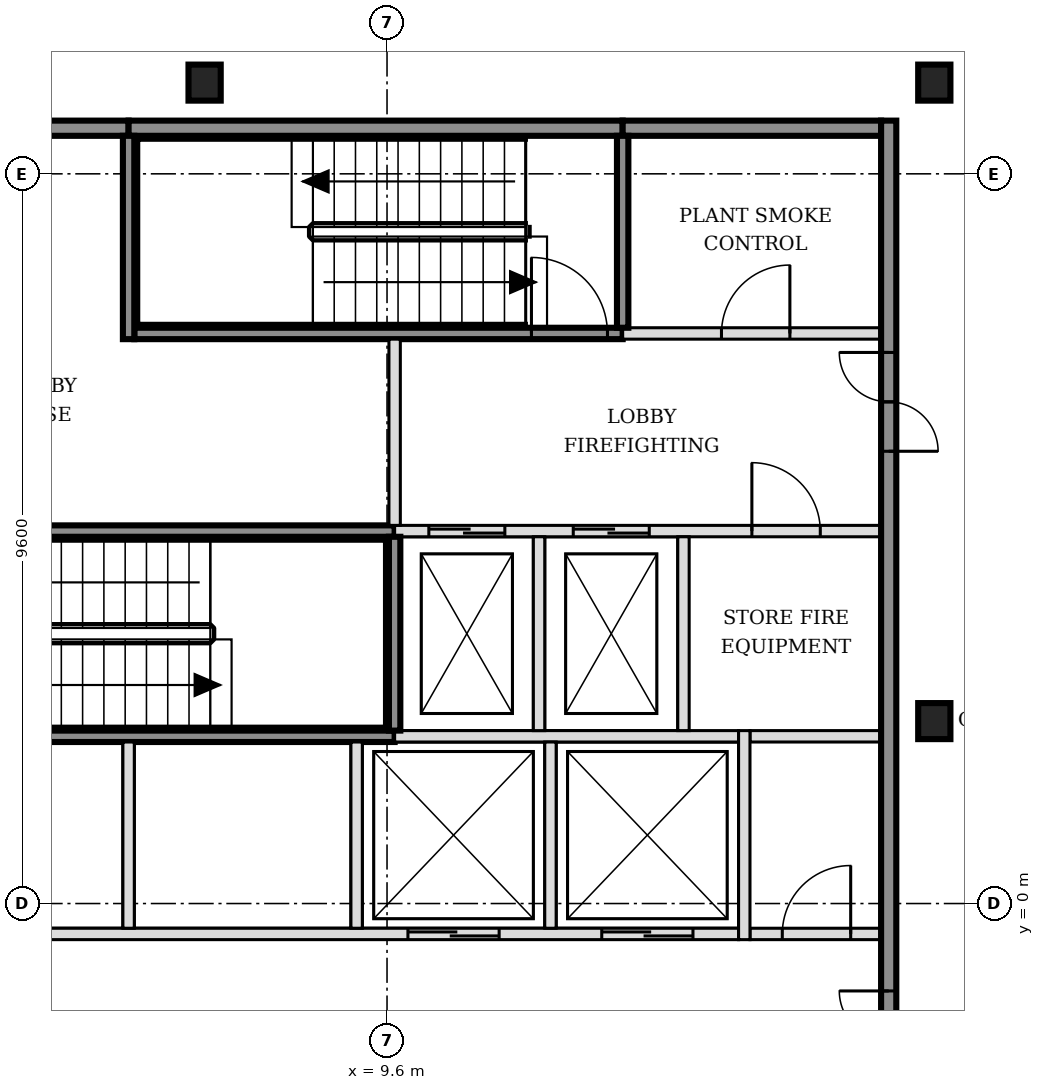
"""IFC4 building model, lengths in metres.
Left out: names, types, materials, properties, quantities, classifications, styles, units other than length and angle.
Written with IfcOpenShell. Run it as: python <this file> out.ifc"""

import sys

from ifc_helpers import new_model, si_unit, direction, frame, frame_2d, origin, origin_2d, place, context, subcontext, project, spatial, rectangle, i_section, extrude, element, fill, save


model = new_model("IFC4")
c1 = context("Model", 3, precision=1e-05, world=origin(), true_north=direction((0.0, 1.0)))
c2 = subcontext(c1, "Body", "Model", "MODEL_VIEW")
j1 = project(units=[si_unit("LENGTHUNIT", "METRE"), si_unit("PLANEANGLEUNIT", "RADIAN")], contexts=[c1])
p1 = place(None, origin())
s1 = spatial("IfcSite", under=j1, at=p1, CompositionType="ELEMENT")
p2 = place(p1, origin())
s2 = spatial("IfcBuilding", under=s1, at=p2, CompositionType="ELEMENT")
p3 = place(p2, frame((0.0, 0.0, 129.0)))
s3 = spatial("IfcBuildingStorey", under=s2, at=p3, CompositionType="ELEMENT", Elevation=129.0)
for number, where, z_axis, x_axis in (
    (1, (16.8, 2.4, -0.15), (0.0, 0.0, 1.0), (1.0, 0.0, 0.0)),
    (2, (7.2, 10.8, -0.15), (0.0, 0.0, 1.0), (1.0, 0.0, 0.0)),
    (3, (16.8, 10.8, -0.15), (0.0, 0.0, 1.0), (1.0, 0.0, 0.0)),
):
    element("IfcColumn", number, at=place(p3, frame(where, z_axis=z_axis, x_axis=x_axis)), inside=s3, PredefinedType="COLUMN", context=c2, shape_type="SweptSolid", body=[
        extrude(i_section(OverallWidth=0.424, OverallDepth=0.474, WebThickness=0.048, FlangeThickness=0.077, FilletRadius=0.015, at=origin_2d()), origin(), (0.0, 0.0, 1.0), 3.6),
    ])
p4 = place(p3, frame((-1.7, -0.4, 0.0), z_axis=(0.0, 0.0, 1.0), x_axis=(1.0, 0.0, 0.0)))
e4 = element("IfcWall", 4, at=p4, inside=s3, PredefinedType="SOLIDWALL", context=c2, shape_type="SweptSolid", body=[
    extrude(rectangle(XDim=15.925, YDim=0.15, at=frame_2d((7.962, 0.0))), origin(), (0.0, 0.0, 1.0), 3.45),
])
p5 = place(p4, frame((11.575, 0.0, 0.0)))
e5 = element("IfcOpeningElement", 5, at=p5, cuts=e4, PredefinedType="OPENING", context=c2, shape_type="SweptSolid", body=[
    extrude(rectangle(XDim=1.2, YDim=2.1, at=frame_2d((0.6, 1.05))), frame((0.0, 0.085, 0.0), z_axis=(0.0, -1.0, 0.0), x_axis=(1.0, 0.0, 0.0)), (0.0, 0.0, 1.0), 0.17),
])
p6 = place(p4, frame((14.125, 0.0, 0.0)))
e6 = element("IfcOpeningElement", 6, at=p6, cuts=e4, PredefinedType="OPENING", context=c2, shape_type="SweptSolid", body=[
    extrude(rectangle(XDim=1.2, YDim=2.1, at=frame_2d((0.6, 1.05))), frame((0.0, 0.085, 0.0), z_axis=(0.0, -1.0, 0.0), x_axis=(1.0, 0.0, 0.0)), (0.0, 0.0, 1.0), 0.17),
])
p7 = place(p3, frame((14.375, -0.4, 0.0), z_axis=(0.0, 0.0, 1.0), x_axis=(1.0, 0.0, 0.0)))
e7 = element("IfcWall", 7, at=p7, inside=s3, PredefinedType="PARTITIONING", context=c2, shape_type="SweptSolid", body=[
    extrude(rectangle(XDim=1.725, YDim=0.15, at=frame_2d((0.863, 0.0))), origin(), (0.0, 0.0, 1.0), 3.45),
])
p8 = place(p7, frame((0.425, 0.0, 0.0)))
e8 = element("IfcOpeningElement", 8, at=p8, cuts=e7, PredefinedType="OPENING", context=c2, shape_type="SweptSolid", body=[
    extrude(rectangle(XDim=0.9, YDim=2.1, at=frame_2d((0.45, 1.05))), frame((0.0, 0.085, 0.0), z_axis=(0.0, -1.0, 0.0), x_axis=(1.0, 0.0, 0.0)), (0.0, 0.0, 1.0), 0.17),
])
p9 = place(p3, frame((3.2, 2.2, 0.0), z_axis=(0.0, 0.0, 1.0), x_axis=(1.0, 0.0, 0.0)))
e9 = element("IfcWall", 9, at=p9, inside=s3, PredefinedType="SOLIDWALL", context=c2, shape_type="SweptSolid", body=[
    extrude(rectangle(XDim=6.5, YDim=0.15, at=frame_2d((3.25, 0.0))), origin(), (0.0, 0.0, 1.0), 3.45),
])
p10 = place(p3, frame((9.7, 2.2, 0.0), z_axis=(0.0, 0.0, 1.0), x_axis=(1.0, 0.0, 0.0)))
e10 = element("IfcWall", 10, at=p10, inside=s3, PredefinedType="SOLIDWALL", context=c2, shape_type="SweptSolid", body=[
    extrude(rectangle(XDim=4.525, YDim=0.15, at=frame_2d((2.263, 0.0))), origin(), (0.0, 0.0, 1.0), 3.45),
])
p11 = place(p3, frame((14.375, 2.2, 0.0), z_axis=(0.0, 0.0, 1.0), x_axis=(1.0, 0.0, 0.0)))
e11 = element("IfcWall", 11, at=p11, inside=s3, PredefinedType="PARTITIONING", context=c2, shape_type="SweptSolid", body=[
    extrude(rectangle(XDim=1.725, YDim=0.15, at=frame_2d((0.863, 0.0))), origin(), (0.0, 0.0, 1.0), 3.45),
])
p12 = place(p3, frame((3.2, 4.9, 0.0), z_axis=(0.0, 0.0, 1.0), x_axis=(1.0, 0.0, 0.0)))
e12 = element("IfcWall", 12, at=p12, inside=s3, PredefinedType="SOLIDWALL", context=c2, shape_type="SweptSolid", body=[
    extrude(rectangle(XDim=6.5, YDim=0.15, at=frame_2d((3.25, 0.0))), origin(), (0.0, 0.0, 1.0), 3.45),
])
p13 = place(p12, frame((0.175, 0.0, 0.0)))
e13 = element("IfcOpeningElement", 13, at=p13, cuts=e12, PredefinedType="OPENING", context=c2, shape_type="SweptSolid", body=[
    extrude(rectangle(XDim=1.0, YDim=2.1, at=frame_2d((0.5, 1.05))), frame((0.0, 0.085, 0.0), z_axis=(0.0, -1.0, 0.0), x_axis=(1.0, 0.0, 0.0)), (0.0, 0.0, 1.0), 0.17),
])
p14 = place(p3, frame((9.7, 4.9, 0.0), z_axis=(0.0, 0.0, 1.0), x_axis=(1.0, 0.0, 0.0)))
e14 = element("IfcWall", 14, at=p14, inside=s3, PredefinedType="SOLIDWALL", context=c2, shape_type="SweptSolid", body=[
    extrude(rectangle(XDim=6.4, YDim=0.15, at=frame_2d((3.2, 0.0))), origin(), (0.0, 0.0, 1.0), 3.45),
])
p15 = place(p14, frame((0.45, 0.0, 0.0)))
e15 = element("IfcOpeningElement", 15, at=p15, cuts=e14, PredefinedType="OPENING", context=c2, shape_type="SweptSolid", body=[
    extrude(rectangle(XDim=1.0, YDim=2.1, at=frame_2d((0.5, 1.05))), frame((0.0, 0.085, 0.0), z_axis=(0.0, -1.0, 0.0), x_axis=(1.0, 0.0, 0.0)), (0.0, 0.0, 1.0), 0.17),
])
p16 = place(p14, frame((2.35, 0.0, 0.0)))
e16 = element("IfcOpeningElement", 16, at=p16, cuts=e14, PredefinedType="OPENING", context=c2, shape_type="SweptSolid", body=[
    extrude(rectangle(XDim=1.0, YDim=2.1, at=frame_2d((0.5, 1.05))), frame((0.0, 0.085, 0.0), z_axis=(0.0, -1.0, 0.0), x_axis=(1.0, 0.0, 0.0)), (0.0, 0.0, 1.0), 0.17),
])
p17 = place(p14, frame((4.7, 0.0, 0.0)))
e17 = element("IfcOpeningElement", 17, at=p17, cuts=e14, PredefinedType="OPENING", context=c2, shape_type="SweptSolid", body=[
    extrude(rectangle(XDim=0.9, YDim=2.1, at=frame_2d((0.45, 1.05))), frame((0.0, 0.085, 0.0), z_axis=(0.0, -1.0, 0.0), x_axis=(1.0, 0.0, 0.0)), (0.0, 0.0, 1.0), 0.17),
])
p18 = place(p3, frame((6.275, 7.5, 0.0), z_axis=(0.0, 0.0, 1.0), x_axis=(1.0, 0.0, 0.0)))
e18 = element("IfcWall", 18, at=p18, inside=s3, PredefinedType="SOLIDWALL", context=c2, shape_type="SweptSolid", body=[
    extrude(rectangle(XDim=6.425, YDim=0.15, at=frame_2d((3.212, 0.0))), origin(), (0.0, 0.0, 1.0), 3.45),
])
p19 = place(p18, frame((5.225, 0.0, 0.0)))
e19 = element("IfcOpeningElement", 19, at=p19, cuts=e18, PredefinedType="OPENING", context=c2, shape_type="SweptSolid", body=[
    extrude(rectangle(XDim=1.0, YDim=2.1, at=frame_2d((0.5, 1.05))), frame((0.0, 0.085, 0.0), z_axis=(0.0, -1.0, 0.0), x_axis=(1.0, 0.0, 0.0)), (0.0, 0.0, 1.0), 0.17),
])
p20 = place(p3, frame((12.7, 7.5, 0.0), z_axis=(0.0, 0.0, 1.0), x_axis=(1.0, 0.0, 0.0)))
e20 = element("IfcWall", 20, at=p20, inside=s3, PredefinedType="SOLIDWALL", context=c2, shape_type="SweptSolid", body=[
    extrude(rectangle(XDim=3.4, YDim=0.15, at=frame_2d((1.7, 0.0))), origin(), (0.0, 0.0, 1.0), 3.45),
])
p21 = place(p20, frame((1.3, 0.0, 0.0)))
e21 = element("IfcOpeningElement", 21, at=p21, cuts=e20, PredefinedType="OPENING", context=c2, shape_type="SweptSolid", body=[
    extrude(rectangle(XDim=0.9, YDim=2.1, at=frame_2d((0.45, 1.05))), frame((0.0, 0.085, 0.0), z_axis=(0.0, -1.0, 0.0), x_axis=(1.0, 0.0, 0.0)), (0.0, 0.0, 1.0), 0.17),
])
p22 = place(p3, frame((-1.7, 10.2, 0.0), z_axis=(0.0, 0.0, 1.0), x_axis=(1.0, 0.0, 0.0)))
e22 = element("IfcWall", 22, at=p22, inside=s3, PredefinedType="SOLIDWALL", context=c2, shape_type="SweptSolid", body=[
    extrude(rectangle(XDim=7.9, YDim=0.2, at=frame_2d((3.95, 0.0))), origin(), (0.0, 0.0, 1.0), 3.45),
])
p23 = place(p3, frame((6.2, 10.2, 0.0), z_axis=(0.0, 0.0, 1.0), x_axis=(1.0, 0.0, 0.0)))
e23 = element("IfcWall", 23, at=p23, inside=s3, PredefinedType="SOLIDWALL", context=c2, shape_type="SweptSolid", body=[
    extrude(rectangle(XDim=6.5, YDim=0.2, at=frame_2d((3.25, 0.0))), origin(), (0.0, 0.0, 1.0), 3.45),
])
p24 = place(p3, frame((12.7, 10.2, 0.0), z_axis=(0.0, 0.0, 1.0), x_axis=(1.0, 0.0, 0.0)))
e24 = element("IfcWall", 24, at=p24, inside=s3, PredefinedType="SOLIDWALL", context=c2, shape_type="SweptSolid", body=[
    extrude(rectangle(XDim=3.4, YDim=0.2, at=frame_2d((1.7, 0.0))), origin(), (0.0, 0.0, 1.0), 3.45),
])
p25 = place(p3, frame((6.2, -0.325, 0.0), z_axis=(0.0, 0.0, 1.0), x_axis=(0.0, 1.0, 0.0)))
e25 = element("IfcWall", 25, at=p25, inside=s3, PredefinedType="SOLIDWALL", context=c2, shape_type="SweptSolid", body=[
    extrude(rectangle(XDim=2.45, YDim=0.15, at=frame_2d((1.225, 0.0))), origin(), (0.0, 0.0, 1.0), 3.45),
])
p26 = place(p3, frame((6.2, 7.425, 0.0), z_axis=(0.0, 0.0, 1.0), x_axis=(0.0, 1.0, 0.0)))
e26 = element("IfcWall", 26, at=p26, inside=s3, PredefinedType="SOLIDWALL", context=c2, shape_type="SweptSolid", body=[
    extrude(rectangle(XDim=2.675, YDim=0.15, at=frame_2d((1.337, 0.0))), origin(), (0.0, 0.0, 1.0), 3.45),
])
p27 = place(p3, frame((9.2, -0.325, 0.0), z_axis=(0.0, 0.0, 1.0), x_axis=(0.0, 1.0, 0.0)))
e27 = element("IfcWall", 27, at=p27, inside=s3, PredefinedType="SOLIDWALL", context=c2, shape_type="SweptSolid", body=[
    extrude(rectangle(XDim=2.45, YDim=0.15, at=frame_2d((1.225, 0.0))), origin(), (0.0, 0.0, 1.0), 3.45),
])
p28 = place(p3, frame((9.7, 2.275, 0.0), z_axis=(0.0, 0.0, 1.0), x_axis=(0.0, 1.0, 0.0)))
e28 = element("IfcWall", 28, at=p28, inside=s3, PredefinedType="SOLIDWALL", context=c2, shape_type="SweptSolid", body=[
    extrude(rectangle(XDim=2.55, YDim=0.15, at=frame_2d((1.275, 0.0))), origin(), (0.0, 0.0, 1.0), 3.45),
])
p29 = place(p3, frame((9.7, 4.975, 0.0), z_axis=(0.0, 0.0, 1.0), x_axis=(0.0, 1.0, 0.0)))
e29 = element("IfcWall", 29, at=p29, inside=s3, PredefinedType="SOLIDWALL", context=c2, shape_type="SweptSolid", body=[
    extrude(rectangle(XDim=2.45, YDim=0.15, at=frame_2d((1.225, 0.0))), origin(), (0.0, 0.0, 1.0), 3.45),
])
p30 = place(p3, frame((11.6, 2.275, 0.0), z_axis=(0.0, 0.0, 1.0), x_axis=(0.0, 1.0, 0.0)))
e30 = element("IfcWall", 30, at=p30, inside=s3, PredefinedType="SOLIDWALL", context=c2, shape_type="SweptSolid", body=[
    extrude(rectangle(XDim=2.55, YDim=0.15, at=frame_2d((1.275, 0.0))), origin(), (0.0, 0.0, 1.0), 3.45),
])
p31 = place(p3, frame((11.75, -0.325, 0.0), z_axis=(0.0, 0.0, 1.0), x_axis=(0.0, 1.0, 0.0)))
e31 = element("IfcWall", 31, at=p31, inside=s3, PredefinedType="SOLIDWALL", context=c2, shape_type="SweptSolid", body=[
    extrude(rectangle(XDim=2.45, YDim=0.15, at=frame_2d((1.225, 0.0))), origin(), (0.0, 0.0, 1.0), 3.45),
])
p32 = place(p3, frame((12.7, 7.575, 0.0), z_axis=(0.0, 0.0, 1.0), x_axis=(0.0, 1.0, 0.0)))
e32 = element("IfcWall", 32, at=p32, inside=s3, PredefinedType="SOLIDWALL", context=c2, shape_type="SweptSolid", body=[
    extrude(rectangle(XDim=2.525, YDim=0.15, at=frame_2d((1.263, 0.0))), origin(), (0.0, 0.0, 1.0), 3.45),
])
p33 = place(p3, frame((13.5, 2.275, 0.0), z_axis=(0.0, 0.0, 1.0), x_axis=(0.0, 1.0, 0.0)))
e33 = element("IfcWall", 33, at=p33, inside=s3, PredefinedType="SOLIDWALL", context=c2, shape_type="SweptSolid", body=[
    extrude(rectangle(XDim=2.55, YDim=0.15, at=frame_2d((1.275, 0.0))), origin(), (0.0, 0.0, 1.0), 3.45),
])
p34 = place(p3, frame((14.3, -0.475, 0.0), z_axis=(0.0, 0.0, 1.0), x_axis=(0.0, 1.0, 0.0)))
e34 = element("IfcWall", 34, at=p34, inside=s3, PredefinedType="SOLIDWALL", context=c2, shape_type="SweptSolid", body=[
    extrude(rectangle(XDim=2.75, YDim=0.15, at=frame_2d((1.375, 0.0))), origin(), (0.0, 0.0, 1.0), 3.45),
])
p35 = place(p3, frame((16.2, -5.5, 0.0), z_axis=(0.0, 0.0, 1.0), x_axis=(0.0, 1.0, 0.0)))
e35 = element("IfcWall", 35, at=p35, inside=s3, PredefinedType="SOLIDWALL", context=c2, shape_type="SweptSolid", body=[
    extrude(rectangle(XDim=15.8, YDim=0.2, at=frame_2d((7.9, 0.0))), origin(), (0.0, 0.0, 1.0), 3.45),
])
p36 = place(p35, frame((3.05, 0.0, 0.0)))
e36 = element("IfcOpeningElement", 36, at=p36, cuts=e35, PredefinedType="OPENING", context=c2, shape_type="SweptSolid", body=[
    extrude(rectangle(XDim=1.3, YDim=2.1, at=frame_2d((0.65, 1.05))), frame((0.0, 0.11, 0.0), z_axis=(0.0, -1.0, 0.0), x_axis=(1.0, 0.0, 0.0)), (0.0, 0.0, 1.0), 0.22),
])
p37 = place(p35, frame((11.45, 0.0, 0.0)))
e37 = element("IfcOpeningElement", 37, at=p37, cuts=e35, PredefinedType="OPENING", context=c2, shape_type="SweptSolid", body=[
    extrude(rectangle(XDim=1.3, YDim=2.1, at=frame_2d((0.65, 1.05))), frame((0.0, 0.11, 0.0), z_axis=(0.0, -1.0, 0.0), x_axis=(1.0, 0.0, 0.0)), (0.0, 0.0, 1.0), 0.22),
])
p38 = place(p3, frame((31.072, 4.722, 0.0), z_axis=(0.0, 0.0, 1.0), x_axis=(-0.707106781187, 0.707106781187, 0.0)))
e38 = element("IfcWall", 38, at=p38, inside=s3, PredefinedType="PARTITIONING", context=c2, shape_type="SweptSolid", body=[
    extrude(rectangle(XDim=23.688, YDim=0.15, at=frame_2d((11.844, 0.0))), origin(), (0.0, 0.0, 1.0), 2.73),
])
p39 = place(p38, frame((8.135, 0.0, 0.0)))
e39 = element("IfcOpeningElement", 39, at=p39, cuts=e38, PredefinedType="OPENING", context=c2, shape_type="SweptSolid", body=[
    extrude(rectangle(XDim=0.9, YDim=2.1, at=frame_2d((0.45, 1.05))), frame((0.0, 0.085, 0.0), z_axis=(0.0, -1.0, 0.0), x_axis=(1.0, 0.0, 0.0)), (0.0, 0.0, 1.0), 0.17),
])
p40 = place(p38, frame((13.091, 0.0, 0.0)))
e40 = element("IfcOpeningElement", 40, at=p40, cuts=e38, PredefinedType="OPENING", context=c2, shape_type="SweptSolid", body=[
    extrude(rectangle(XDim=0.9, YDim=2.1, at=frame_2d((0.45, 1.05))), frame((0.0, 0.085, 0.0), z_axis=(0.0, -1.0, 0.0), x_axis=(1.0, 0.0, 0.0)), (0.0, 0.0, 1.0), 0.17),
])
p41 = place(p38, frame((18.69, 0.0, 0.0)))
e41 = element("IfcOpeningElement", 41, at=p41, cuts=e38, PredefinedType="OPENING", context=c2, shape_type="SweptSolid", body=[
    extrude(rectangle(XDim=0.9, YDim=2.1, at=frame_2d((0.45, 1.05))), frame((0.0, 0.085, 0.0), z_axis=(0.0, -1.0, 0.0), x_axis=(1.0, 0.0, 0.0)), (0.0, 0.0, 1.0), 0.17),
])
p42 = place(p5, origin())
e42 = element("IfcDoor", 42, at=p42, inside=s3, OperationType="DOUBLE_DOOR_SLIDING", PredefinedType="DOOR", context=c2, shape_type="SweptSolid", body=[
    extrude(rectangle(XDim=1.2, YDim=2.1, at=frame_2d((0.6, 1.05))), frame((0.0, 0.025, 0.0), z_axis=(0.0, -1.0, 0.0), x_axis=(1.0, 0.0, 0.0)), (0.0, 0.0, 1.0), 0.05),
])
fill(e5, e42)
p43 = place(p6, origin())
e43 = element("IfcDoor", 43, at=p43, inside=s3, OperationType="DOUBLE_DOOR_SLIDING", PredefinedType="DOOR", context=c2, shape_type="SweptSolid", body=[
    extrude(rectangle(XDim=1.2, YDim=2.1, at=frame_2d((0.6, 1.05))), frame((0.0, 0.025, 0.0), z_axis=(0.0, -1.0, 0.0), x_axis=(1.0, 0.0, 0.0)), (0.0, 0.0, 1.0), 0.05),
])
fill(e6, e43)
p44 = place(p15, origin())
e44 = element("IfcDoor", 44, at=p44, inside=s3, OperationType="DOUBLE_DOOR_SLIDING", PredefinedType="DOOR", context=c2, shape_type="SweptSolid", body=[
    extrude(rectangle(XDim=1.0, YDim=2.1, at=frame_2d((0.5, 1.05))), frame((0.0, 0.025, 0.0), z_axis=(0.0, -1.0, 0.0), x_axis=(1.0, 0.0, 0.0)), (0.0, 0.0, 1.0), 0.05),
])
fill(e15, e44)
p45 = place(p16, origin())
e45 = element("IfcDoor", 45, at=p45, inside=s3, OperationType="DOUBLE_DOOR_SLIDING", PredefinedType="DOOR", context=c2, shape_type="SweptSolid", body=[
    extrude(rectangle(XDim=1.0, YDim=2.1, at=frame_2d((0.5, 1.05))), frame((0.0, 0.025, 0.0), z_axis=(0.0, -1.0, 0.0), x_axis=(1.0, 0.0, 0.0)), (0.0, 0.0, 1.0), 0.05),
])
fill(e16, e45)
p46 = place(p19, origin())
e46 = element("IfcDoor", 46, at=p46, inside=s3, OperationType="SINGLE_SWING_LEFT", PredefinedType="DOOR", context=c2, shape_type="SweptSolid", body=[
    extrude(rectangle(XDim=1.0, YDim=2.1, at=frame_2d((0.5, 1.05))), frame((0.0, 0.025, 0.0), z_axis=(0.0, -1.0, 0.0), x_axis=(1.0, 0.0, 0.0)), (0.0, 0.0, 1.0), 0.05),
])
fill(e19, e46)
p47 = place(p36, origin())
e47 = element("IfcDoor", 47, at=p47, inside=s3, OperationType="DOUBLE_DOOR_SINGLE_SWING", PredefinedType="DOOR", context=c2, shape_type="SweptSolid", body=[
    extrude(rectangle(XDim=1.3, YDim=2.1, at=frame_2d((0.65, 1.05))), frame((0.0, 0.025, 0.0), z_axis=(0.0, -1.0, 0.0), x_axis=(1.0, 0.0, 0.0)), (0.0, 0.0, 1.0), 0.05),
])
fill(e36, e47)
p48 = place(p37, origin())
e48 = element("IfcDoor", 48, at=p48, inside=s3, OperationType="DOUBLE_DOOR_SINGLE_SWING", PredefinedType="DOOR", context=c2, shape_type="SweptSolid", body=[
    extrude(rectangle(XDim=1.3, YDim=2.1, at=frame_2d((0.65, 1.05))), frame((0.0, 0.025, 0.0), z_axis=(0.0, -1.0, 0.0), x_axis=(1.0, 0.0, 0.0)), (0.0, 0.0, 1.0), 0.05),
])
fill(e37, e48)
p49 = place(p8, origin())
e49 = element("IfcDoor", 49, at=p49, inside=s3, OperationType="SINGLE_SWING_RIGHT", PredefinedType="DOOR", context=c2, shape_type="SweptSolid", body=[
    extrude(rectangle(XDim=0.9, YDim=2.1, at=frame_2d((0.45, 1.05))), frame((0.0, 0.025, 0.0), z_axis=(0.0, -1.0, 0.0), x_axis=(1.0, 0.0, 0.0)), (0.0, 0.0, 1.0), 0.05),
])
fill(e8, e49)
p50 = place(p17, origin())
e50 = element("IfcDoor", 50, at=p50, inside=s3, OperationType="SINGLE_SWING_LEFT", PredefinedType="DOOR", context=c2, shape_type="SweptSolid", body=[
    extrude(rectangle(XDim=0.9, YDim=2.1, at=frame_2d((0.45, 1.05))), frame((0.0, 0.025, 0.0), z_axis=(0.0, -1.0, 0.0), x_axis=(1.0, 0.0, 0.0)), (0.0, 0.0, 1.0), 0.05),
])
fill(e17, e50)
p51 = place(p21, origin())
e51 = element("IfcDoor", 51, at=p51, inside=s3, OperationType="SINGLE_SWING_RIGHT", PredefinedType="DOOR", context=c2, shape_type="SweptSolid", body=[
    extrude(rectangle(XDim=0.9, YDim=2.1, at=frame_2d((0.45, 1.05))), frame((0.0, 0.025, 0.0), z_axis=(0.0, -1.0, 0.0), x_axis=(1.0, 0.0, 0.0)), (0.0, 0.0, 1.0), 0.05),
])
fill(e21, e51)
save(model, sys.argv[1])
